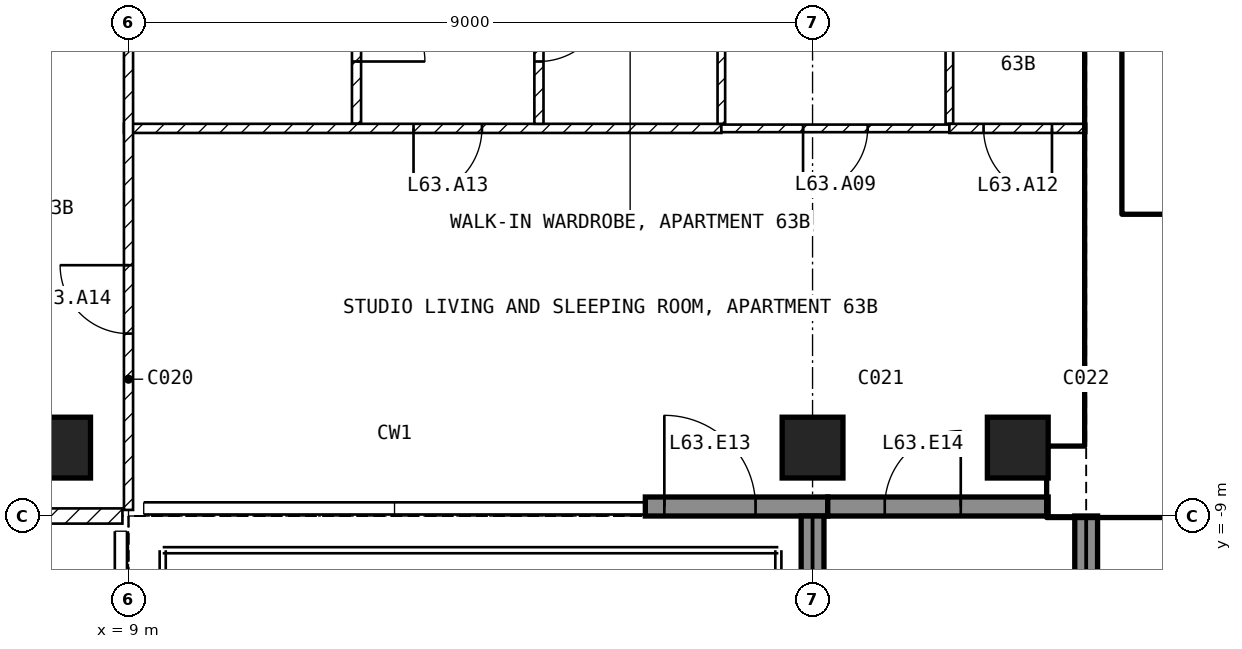
"""IFC4 building model, lengths in metres.
Left out: names, types, materials, properties, quantities, classifications, styles, units other than length and angle.
Written with IfcOpenShell. Run it as: python <this file> out.ifc"""

import sys

from ifc_helpers import new_model, si_unit, direction, frame, frame_2d, origin, origin_2d, place, context, subcontext, project, spatial, rectangle, extrude, element, fill, save


model = new_model("IFC4")
c1 = context("Model", 3, precision=1e-05, world=origin(), true_north=direction((0.0, 1.0)))
c2 = subcontext(c1, "Body", "Model", "MODEL_VIEW")
j1 = project(units=[si_unit("LENGTHUNIT", "METRE"), si_unit("PLANEANGLEUNIT", "RADIAN")], contexts=[c1])
p1 = place(None, origin())
s1 = spatial("IfcSite", under=j1, at=p1, CompositionType="ELEMENT")
p2 = place(p1, origin())
s2 = spatial("IfcBuilding", under=s1, at=p2, CompositionType="ELEMENT")
p3 = place(p2, frame((0.0, 0.0, 250.0)))
s3 = spatial("IfcBuildingStorey", under=s2, at=p3, CompositionType="ELEMENT", Elevation=250.0)
for number, where, z_axis, x_axis in (
    (1, (8.1, -8.1, -0.25), (0.0, 0.0, 1.0), (1.0, 0.0, 0.0)),
    (2, (18.0, -8.1, -0.25), (0.0, 0.0, 1.0), (1.0, 0.0, 0.0)),
    (3, (20.7, -8.1, -0.25), (0.0, 0.0, 1.0), (1.0, 0.0, 0.0)),
):
    element("IfcColumn", number, at=place(p3, frame(where, z_axis=z_axis, x_axis=x_axis)), inside=s3, PredefinedType="COLUMN", context=c2, shape_type="SweptSolid", body=[
        extrude(rectangle(XDim=0.8, YDim=0.8, at=origin_2d()), origin(), (0.0, 0.0, 1.0), 3.5),
    ])
p4 = place(p3, frame((15.8, -8.875, 0.0), z_axis=(0.0, 0.0, 1.0), x_axis=(1.0, 0.0, 0.0)))
e4 = element("IfcWall", 4, at=p4, inside=s3, PredefinedType="SOLIDWALL", context=c2, shape_type="SweptSolid", body=[
    extrude(rectangle(XDim=2.4, YDim=0.25, at=frame_2d((1.2, 0.0))), origin(), (0.0, 0.0, 1.0), 3.25),
])
p5 = place(p4, frame((0.25, 0.0, 0.0)))
e5 = element("IfcOpeningElement", 5, at=p5, cuts=e4, PredefinedType="OPENING", context=c2, shape_type="SweptSolid", body=[
    extrude(rectangle(XDim=1.2, YDim=2.4, at=frame_2d((0.6, 1.2))), frame((0.0, 0.135, 0.0), z_axis=(0.0, -1.0, 0.0), x_axis=(1.0, 0.0, 0.0)), (0.0, 0.0, 1.0), 0.27),
])
p6 = place(p3, frame((18.2, -8.875, 0.0), z_axis=(0.0, 0.0, 1.0), x_axis=(1.0, 0.0, 0.0)))
e6 = element("IfcWall", 6, at=p6, inside=s3, PredefinedType="SOLIDWALL", context=c2, shape_type="SweptSolid", body=[
    extrude(rectangle(XDim=2.9, YDim=0.25, at=frame_2d((1.45, 0.0))), origin(), (0.0, 0.0, 1.0), 3.25),
])
p7 = place(p6, frame((0.75, 0.0, 0.0)))
e7 = element("IfcOpeningElement", 7, at=p7, cuts=e6, PredefinedType="OPENING", context=c2, shape_type="SweptSolid", body=[
    extrude(rectangle(XDim=1.0, YDim=2.4, at=frame_2d((0.5, 1.2))), frame((0.0, 0.135, 0.0), z_axis=(0.0, -1.0, 0.0), x_axis=(1.0, 0.0, 0.0)), (0.0, 0.0, 1.0), 0.27),
])
p8 = place(p3, frame((18.0, -9.0, 0.0), z_axis=(0.0, 0.0, 1.0), x_axis=(0.0, -1.0, 0.0)))
e8 = element("IfcWall", 8, at=p8, inside=s3, PredefinedType="SOLIDWALL", context=c2, shape_type="SweptSolid", body=[
    extrude(rectangle(XDim=2.74, YDim=0.3, at=frame_2d((1.37, 0.0))), origin(), (0.0, 0.0, 1.0), 3.25),
])
p9 = place(p3, frame((21.6, -9.0, 0.0), z_axis=(0.0, 0.0, 1.0), x_axis=(0.0, -1.0, 0.0)))
e9 = element("IfcWall", 9, at=p9, inside=s3, PredefinedType="SOLIDWALL", context=c2, shape_type="SweptSolid", body=[
    extrude(rectangle(XDim=2.7, YDim=0.3, at=frame_2d((1.35, 0.0))), origin(), (0.0, 0.0, 1.0), 3.25),
])
p10 = place(p3, frame((21.1, -8.55, 0.0), z_axis=(0.0, 0.0, 1.0), x_axis=(1.0, 0.0, 0.0)))
e10 = element("IfcWall", 10, at=p10, inside=s3, PredefinedType="SHEAR", context=c2, shape_type="SweptSolid", body=[
    extrude(rectangle(XDim=9.1, YDim=0.9, at=frame_2d((4.55, 0.0))), origin(), (0.0, 0.0, 1.0), 3.25),
])
p11 = place(p3, frame((21.825, -8.1, 0.0), z_axis=(0.0, 0.0, 1.0), x_axis=(0.0, 1.0, 0.0)))
e11 = element("IfcWall", 11, at=p11, inside=s3, PredefinedType="SHEAR", context=c2, shape_type="SweptSolid", body=[
    extrude(rectangle(XDim=6.9, YDim=0.45, at=frame_2d((3.45, 0.0))), origin(), (0.0, 0.0, 1.0), 3.25),
])
p12 = place(p3, frame((22.05, -5.15, 0.0), z_axis=(0.0, 0.0, 1.0), x_axis=(1.0, 0.0, 0.0)))
e12 = element("IfcWall", 12, at=p12, inside=s3, PredefinedType="SOLIDWALL", context=c2, shape_type="SweptSolid", body=[
    extrude(rectangle(XDim=6.3, YDim=0.2, at=frame_2d((3.15, 0.0))), origin(), (0.0, 0.0, 1.0), 3.25),
])
p13 = place(p12, frame((0.2, 0.0, 0.0)))
e13 = element("IfcOpeningElement", 13, at=p13, cuts=e12, PredefinedType="OPENING", context=c2, shape_type="SweptSolid", body=[
    extrude(rectangle(XDim=1.0, YDim=2.1, at=frame_2d((0.5, 1.05))), frame((0.0, 0.11, 0.0), z_axis=(0.0, -1.0, 0.0), x_axis=(1.0, 0.0, 0.0)), (0.0, 0.0, 1.0), 0.22),
])
p14 = place(p3, frame((8.92, -9.0, 0.0), z_axis=(0.0, 0.0, 1.0), x_axis=(-1.0, 0.0, 0.0)))
e14 = element("IfcWall", 14, at=p14, inside=s3, PredefinedType="PARTITIONING", context=c2, shape_type="SweptSolid", body=[
    extrude(rectangle(XDim=17.84, YDim=0.2, at=frame_2d((8.92, 0.0))), origin(), (0.0, 0.0, 1.0), 3.25),
])
p15 = place(p14, frame((8.42, 0.0, 0.0)))
e15 = element("IfcOpeningElement", 15, at=p15, cuts=e14, PredefinedType="OPENING", context=c2, shape_type="SweptSolid", body=[
    extrude(rectangle(XDim=1.0, YDim=2.1, at=frame_2d((0.5, 1.05))), frame((0.0, 0.11, 0.0), z_axis=(0.0, -1.0, 0.0), x_axis=(1.0, 0.0, 0.0)), (0.0, 0.0, 1.0), 0.22),
])
p16 = place(p3, frame((12.0, -1.3, 0.0), z_axis=(0.0, 0.0, 1.0), x_axis=(0.0, -1.0, 0.0)))
e16 = element("IfcWall", 16, at=p16, inside=s3, PredefinedType="PARTITIONING", context=c2, shape_type="SweptSolid", body=[
    extrude(rectangle(XDim=2.54, YDim=0.12, at=frame_2d((1.27, 0.0))), origin(), (0.0, 0.0, 1.0), 3.25),
])
p17 = place(p16, frame((0.82, 0.0, 0.0)))
e17 = element("IfcOpeningElement", 17, at=p17, cuts=e16, PredefinedType="OPENING", context=c2, shape_type="SweptSolid", body=[
    extrude(rectangle(XDim=0.9, YDim=2.1, at=frame_2d((0.45, 1.05))), frame((0.0, 0.07, 0.0), z_axis=(0.0, -1.0, 0.0), x_axis=(1.0, 0.0, 0.0)), (0.0, 0.0, 1.0), 0.14),
])
p18 = place(p3, frame((16.8, -3.9, 0.0), z_axis=(0.0, 0.0, 1.0), x_axis=(-1.0, 0.0, 0.0)))
e18 = element("IfcWall", 18, at=p18, inside=s3, PredefinedType="PARTITIONING", context=c2, shape_type="SweptSolid", body=[
    extrude(rectangle(XDim=7.86, YDim=0.12, at=frame_2d((3.93, 0.0))), origin(), (0.0, 0.0, 1.0), 3.25),
])
p19 = place(p18, frame((3.15, 0.0, 0.0)))
e19 = element("IfcOpeningElement", 19, at=p19, cuts=e18, PredefinedType="OPENING", context=c2, shape_type="SweptSolid", body=[
    extrude(rectangle(XDim=0.9, YDim=2.1, at=frame_2d((0.45, 1.05))), frame((0.0, 0.07, 0.0), z_axis=(0.0, -1.0, 0.0), x_axis=(1.0, 0.0, 0.0)), (0.0, 0.0, 1.0), 0.14),
])
p20 = place(p3, frame((9.0, -8.92, 0.0), z_axis=(0.0, 0.0, 1.0), x_axis=(0.0, 1.0, 0.0)))
e20 = element("IfcWall", 20, at=p20, inside=s3, PredefinedType="PARTITIONING", context=c2, shape_type="SweptSolid", body=[
    extrude(rectangle(XDim=7.62, YDim=0.12, at=frame_2d((3.81, 0.0))), origin(), (0.0, 0.0, 1.0), 3.25),
])
p21 = place(p20, frame((2.32, 0.0, 0.0)))
e21 = element("IfcOpeningElement", 21, at=p21, cuts=e20, PredefinedType="OPENING", context=c2, shape_type="SweptSolid", body=[
    extrude(rectangle(XDim=0.9, YDim=2.1, at=frame_2d((0.45, 1.05))), frame((0.0, 0.07, 0.0), z_axis=(0.0, -1.0, 0.0), x_axis=(1.0, 0.0, 0.0)), (0.0, 0.0, 1.0), 0.14),
])
p22 = place(p3, frame((14.4, -1.3, 0.0), z_axis=(0.0, 0.0, 1.0), x_axis=(0.0, -1.0, 0.0)))
e22 = element("IfcWall", 22, at=p22, inside=s3, PredefinedType="PARTITIONING", context=c2, shape_type="SweptSolid", body=[
    extrude(rectangle(XDim=2.54, YDim=0.12, at=frame_2d((1.27, 0.0))), origin(), (0.0, 0.0, 1.0), 3.25),
])
p23 = place(p22, frame((0.82, 0.0, 0.0)))
e23 = element("IfcOpeningElement", 23, at=p23, cuts=e22, PredefinedType="OPENING", context=c2, shape_type="SweptSolid", body=[
    extrude(rectangle(XDim=0.9, YDim=2.1, at=frame_2d((0.45, 1.05))), frame((0.0, 0.07, 0.0), z_axis=(0.0, -1.0, 0.0), x_axis=(1.0, 0.0, 0.0)), (0.0, 0.0, 1.0), 0.14),
])
for number, where, z_axis, x_axis in (
    (24, (16.8, -1.3, 0.0), (0.0, 0.0, 1.0), (0.0, -1.0, 0.0)),
    (25, (19.8, -1.3, 0.0), (0.0, 0.0, 1.0), (0.0, -1.0, 0.0)),
):
    element("IfcWall", number, at=place(p3, frame(where, z_axis=z_axis, x_axis=x_axis)), inside=s3, PredefinedType="PARTITIONING", context=c2, shape_type="SweptSolid", body=[
        extrude(rectangle(XDim=2.54, YDim=0.1, at=frame_2d((1.27, 0.0))), origin(), (0.0, 0.0, 1.0), 3.25),
    ])
p24 = place(p3, frame((19.8, -3.9, 0.0), z_axis=(0.0, 0.0, 1.0), x_axis=(-1.0, 0.0, 0.0)))
e26 = element("IfcWall", 26, at=p24, inside=s3, PredefinedType="PARTITIONING", context=c2, shape_type="SweptSolid", body=[
    extrude(rectangle(XDim=3.0, YDim=0.1, at=frame_2d((1.5, 0.0))), origin(), (0.0, 0.0, 1.0), 3.25),
])
p25 = place(p24, frame((1.075, 0.0, 0.0)))
e27 = element("IfcOpeningElement", 27, at=p25, cuts=e26, PredefinedType="OPENING", context=c2, shape_type="SweptSolid", body=[
    extrude(rectangle(XDim=0.85, YDim=2.1, at=frame_2d((0.425, 1.05))), frame((0.0, 0.06, 0.0), z_axis=(0.0, -1.0, 0.0), x_axis=(1.0, 0.0, 0.0)), (0.0, 0.0, 1.0), 0.12),
])
p26 = place(p3, frame((21.6, -3.9, 0.0), z_axis=(0.0, 0.0, 1.0), x_axis=(-1.0, 0.0, 0.0)))
e28 = element("IfcWall", 28, at=p26, inside=s3, PredefinedType="PARTITIONING", context=c2, shape_type="SweptSolid", body=[
    extrude(rectangle(XDim=1.8, YDim=0.12, at=frame_2d((0.9, 0.0))), origin(), (0.0, 0.0, 1.0), 3.25),
])
p27 = place(p26, frame((0.45, 0.0, 0.0)))
e29 = element("IfcOpeningElement", 29, at=p27, cuts=e28, PredefinedType="OPENING", context=c2, shape_type="SweptSolid", body=[
    extrude(rectangle(XDim=0.9, YDim=2.1, at=frame_2d((0.45, 1.05))), frame((0.0, 0.07, 0.0), z_axis=(0.0, -1.0, 0.0), x_axis=(1.0, 0.0, 0.0)), (0.0, 0.0, 1.0), 0.14),
])
p28 = place(p5, origin())
e30 = element("IfcDoor", 30, at=p28, inside=s3, OperationType="SINGLE_SWING_LEFT", PredefinedType="DOOR", context=c2, shape_type="SweptSolid", body=[
    extrude(rectangle(XDim=1.2, YDim=2.4, at=frame_2d((0.6, 1.2))), frame((0.0, 0.025, 0.0), z_axis=(0.0, -1.0, 0.0), x_axis=(1.0, 0.0, 0.0)), (0.0, 0.0, 1.0), 0.05),
])
fill(e5, e30)
p29 = place(p7, origin())
e31 = element("IfcDoor", 31, at=p29, inside=s3, OperationType="SINGLE_SWING_RIGHT", PredefinedType="DOOR", context=c2, shape_type="SweptSolid", body=[
    extrude(rectangle(XDim=1.0, YDim=2.4, at=frame_2d((0.5, 1.2))), frame((0.0, 0.025, 0.0), z_axis=(0.0, -1.0, 0.0), x_axis=(1.0, 0.0, 0.0)), (0.0, 0.0, 1.0), 0.05),
])
fill(e7, e31)
p30 = place(p13, origin())
e32 = element("IfcDoor", 32, at=p30, inside=s3, OperationType="SINGLE_SWING_LEFT", PredefinedType="DOOR", context=c2, shape_type="SweptSolid", body=[
    extrude(rectangle(XDim=1.0, YDim=2.1, at=frame_2d((0.5, 1.05))), frame((0.0, 0.025, 0.0), z_axis=(0.0, -1.0, 0.0), x_axis=(1.0, 0.0, 0.0)), (0.0, 0.0, 1.0), 0.05),
])
fill(e13, e32)
p31 = place(p25, origin())
e33 = element("IfcDoor", 33, at=p31, inside=s3, OperationType="SINGLE_SWING_RIGHT", PredefinedType="DOOR", context=c2, shape_type="SweptSolid", body=[
    extrude(rectangle(XDim=0.85, YDim=2.1, at=frame_2d((0.425, 1.05))), frame((0.0, 0.025, 0.0), z_axis=(0.0, -1.0, 0.0), x_axis=(1.0, 0.0, 0.0)), (0.0, 0.0, 1.0), 0.05),
])
fill(e27, e33)
p32 = place(p17, origin())
e34 = element("IfcDoor", 34, at=p32, inside=s3, OperationType="SINGLE_SWING_RIGHT", PredefinedType="DOOR", context=c2, shape_type="SweptSolid", body=[
    extrude(rectangle(XDim=0.9, YDim=2.1, at=frame_2d((0.45, 1.05))), frame((0.0, 0.025, 0.0), z_axis=(0.0, -1.0, 0.0), x_axis=(1.0, 0.0, 0.0)), (0.0, 0.0, 1.0), 0.05),
])
fill(e17, e34)
p33 = place(p27, origin())
e35 = element("IfcDoor", 35, at=p33, inside=s3, OperationType="SINGLE_SWING_LEFT", PredefinedType="DOOR", context=c2, shape_type="SweptSolid", body=[
    extrude(rectangle(XDim=0.9, YDim=2.1, at=frame_2d((0.45, 1.05))), frame((0.0, 0.025, 0.0), z_axis=(0.0, -1.0, 0.0), x_axis=(1.0, 0.0, 0.0)), (0.0, 0.0, 1.0), 0.05),
])
fill(e29, e35)
p34 = place(p19, origin())
e36 = element("IfcDoor", 36, at=p34, inside=s3, OperationType="SINGLE_SWING_RIGHT", PredefinedType="DOOR", context=c2, shape_type="SweptSolid", body=[
    extrude(rectangle(XDim=0.9, YDim=2.1, at=frame_2d((0.45, 1.05))), frame((0.0, 0.025, 0.0), z_axis=(0.0, -1.0, 0.0), x_axis=(1.0, 0.0, 0.0)), (0.0, 0.0, 1.0), 0.05),
])
fill(e19, e36)
p35 = place(p21, origin())
e37 = element("IfcDoor", 37, at=p35, inside=s3, OperationType="SINGLE_SWING_RIGHT", PredefinedType="DOOR", context=c2, shape_type="SweptSolid", body=[
    extrude(rectangle(XDim=0.9, YDim=2.1, at=frame_2d((0.45, 1.05))), frame((0.0, 0.025, 0.0), z_axis=(0.0, -1.0, 0.0), x_axis=(1.0, 0.0, 0.0)), (0.0, 0.0, 1.0), 0.05),
])
fill(e21, e37)
p36 = place(p23, origin())
e38 = element("IfcDoor", 38, at=p36, inside=s3, OperationType="SINGLE_SWING_LEFT", PredefinedType="DOOR", context=c2, shape_type="SweptSolid", body=[
    extrude(rectangle(XDim=0.9, YDim=2.1, at=frame_2d((0.45, 1.05))), frame((0.0, 0.025, 0.0), z_axis=(0.0, -1.0, 0.0), x_axis=(1.0, 0.0, 0.0)), (0.0, 0.0, 1.0), 0.05),
])
fill(e23, e38)
save(model, sys.argv[1])
